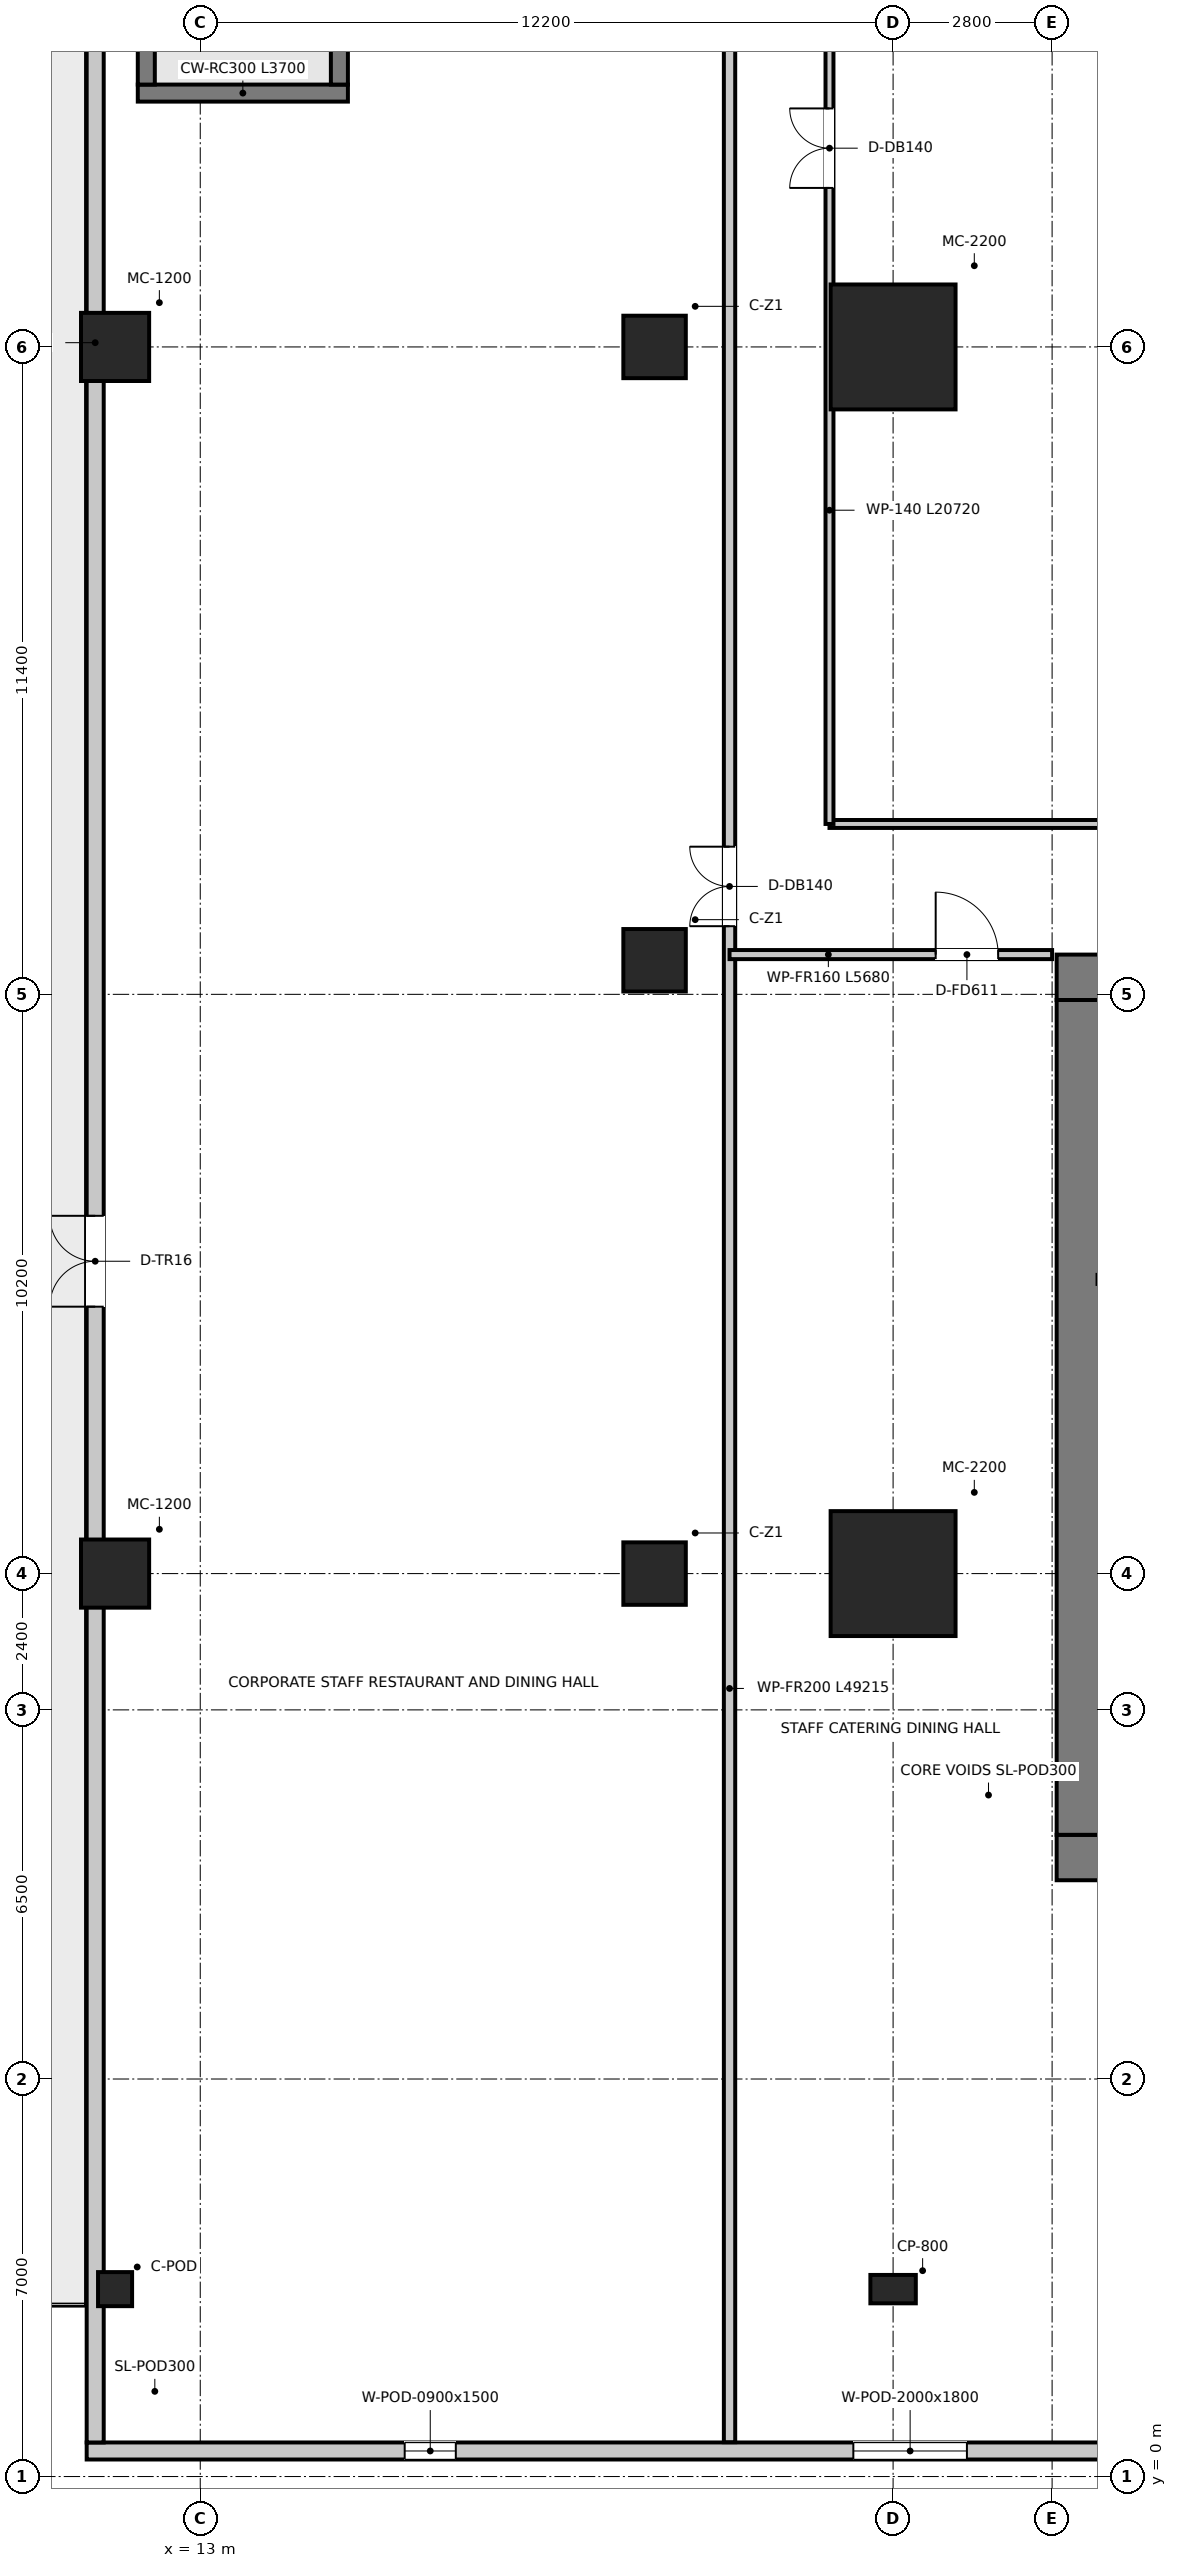
"""IFC4 building model, lengths in metres.
Left out: names, types, materials, properties, quantities, classifications, styles, units other than length and angle.
Written with IfcOpenShell. Run it as: python <this file> out.ifc"""

import sys

from ifc_helpers import new_model, si_unit, direction, frame, frame_2d, origin, origin_2d, place, context, subcontext, project, spatial, rectangle, extrude, source, transform, mapped, element, fill, save


model = new_model("IFC4")
c1 = context("Model", 3, precision=1e-05, world=origin(), true_north=direction((0.0, 1.0)))
c2 = subcontext(c1, "Body", "Model", "MODEL_VIEW")
j1 = project(units=[si_unit("LENGTHUNIT", "METRE"), si_unit("PLANEANGLEUNIT", "RADIAN")], contexts=[c1])
p1 = place(None, origin())
s1 = spatial("IfcSite", under=j1, at=p1, CompositionType="ELEMENT")
p2 = place(p1, origin())
s2 = spatial("IfcBuilding", under=s1, at=p2, CompositionType="ELEMENT")
p3 = place(p2, frame((0.0, 0.0, 15.4)))
s3 = spatial("IfcBuildingStorey", under=s2, at=p3, CompositionType="ELEMENT", Elevation=15.4)
p4 = place(p3, frame((28.08, 10.9, 0.0), z_axis=(0.0, 0.0, 1.0), x_axis=(1.0, 0.0, 0.0)))
e1 = element("IfcWall", 1, at=p4, inside=s3, PredefinedType="SHEAR", context=c2, shape_type="SweptSolid", body=[
    extrude(rectangle(XDim=15.84, YDim=0.8, at=frame_2d((7.92, 0.0))), origin(), (0.0, 0.0, 1.0), 4.6),
])
p5 = place(p3, frame((28.08, 26.4, 0.0), z_axis=(0.0, 0.0, 1.0), x_axis=(1.0, 0.0, 0.0)))
e2 = element("IfcWall", 2, at=p5, inside=s3, PredefinedType="SHEAR", context=c2, shape_type="SweptSolid", body=[
    extrude(rectangle(XDim=15.84, YDim=0.8, at=frame_2d((7.92, 0.0))), origin(), (0.0, 0.0, 1.0), 4.6),
])
p6 = place(p5, frame((7.22, 0.0, 0.0)))
e3 = element("IfcOpeningElement", 3, at=p6, cuts=e2, PredefinedType="OPENING", context=c2, shape_type="SweptSolid", body=[
    extrude(rectangle(XDim=1.4, YDim=2.2, at=frame_2d((0.7, 1.1))), frame((0.0, 0.41, 0.0), z_axis=(0.0, -1.0, 0.0), x_axis=(1.0, 0.0, 0.0)), (0.0, 0.0, 1.0), 0.82),
])
p7 = place(p5, frame((1.775, 0.0, 0.0)))
e4 = element("IfcOpeningElement", 4, at=p7, cuts=e2, PredefinedType="OPENING", context=c2, shape_type="SweptSolid", body=[
    extrude(rectangle(XDim=1.05, YDim=2.1, at=frame_2d((0.525, 1.05))), frame((0.0, 0.41, 0.0), z_axis=(0.0, -1.0, 0.0), x_axis=(1.0, 0.0, 0.0)), (0.0, 0.0, 1.0), 0.82),
])
p8 = place(p5, frame((13.015, 0.0, 0.0)))
e5 = element("IfcOpeningElement", 5, at=p8, cuts=e2, PredefinedType="OPENING", context=c2, shape_type="SweptSolid", body=[
    extrude(rectangle(XDim=1.05, YDim=2.1, at=frame_2d((0.525, 1.05))), frame((0.0, 0.41, 0.0), z_axis=(0.0, -1.0, 0.0), x_axis=(1.0, 0.0, 0.0)), (0.0, 0.0, 1.0), 0.82),
])
p9 = place(p3, frame((28.48, 11.3, 0.0), z_axis=(0.0, 0.0, 1.0), x_axis=(0.0, 1.0, 0.0)))
e6 = element("IfcWall", 6, at=p9, inside=s3, PredefinedType="SHEAR", context=c2, shape_type="SweptSolid", body=[
    extrude(rectangle(XDim=14.7, YDim=0.8, at=frame_2d((7.35, 0.0))), origin(), (0.0, 0.0, 1.0), 4.6),
])
p10 = place(p3, frame((11.9, 41.97, 0.0), z_axis=(0.0, 0.0, 1.0), x_axis=(1.0, 0.0, 0.0)))
e7 = element("IfcWall", 7, at=p10, inside=s3, PredefinedType="SHEAR", context=c2, shape_type="SweptSolid", body=[
    extrude(rectangle(XDim=3.7, YDim=0.3, at=frame_2d((1.85, 0.0))), origin(), (0.0, 0.0, 1.0), 4.6),
])
for number, where, z_axis, x_axis in (
    (8, (12.05, 42.12, 0.0), (0.0, 0.0, 1.0), (0.0, 1.0, 0.0)),
    (9, (15.45, 42.12, 0.0), (0.0, 0.0, 1.0), (0.0, 1.0, 0.0)),
):
    element("IfcWall", number, at=place(p3, frame(where, z_axis=z_axis, x_axis=x_axis)), inside=s3, PredefinedType="SHEAR", context=c2, shape_type="SweptSolid", body=[
        extrude(rectangle(XDim=7.48, YDim=0.3, at=frame_2d((3.74, 0.0))), origin(), (0.0, 0.0, 1.0), 4.6),
    ])
m1 = source(origin(), c2, "Body", "SweptSolid", [
    extrude(rectangle(XDim=2.2, YDim=2.2, at=origin_2d()), origin(), (0.0, 0.0, 1.0), 4.6),
])
for number, where, z_axis, x_axis in (
    (10, (25.2, 15.9, 0.0), (0.0, 0.0, 1.0), (1.0, 0.0, 0.0)),
    (11, (25.2, 37.5, 0.0), (0.0, 0.0, 1.0), (1.0, 0.0, 0.0)),
):
    element("IfcColumn", number, at=place(p3, frame(where, z_axis=z_axis, x_axis=x_axis)), inside=s3, PredefinedType="USERDEFINED", context=c2, shape_type="MappedRepresentation", body=[
        mapped(m1, transform((0.0, 0.0, 0.0), x_axis=(1.0, 0.0, 0.0), y_axis=(0.0, 1.0, 0.0), z_axis=(0.0, 0.0, 1.0), scale=1.0)),
    ])
m2 = source(origin(), c2, "Body", "SweptSolid", [
    extrude(rectangle(XDim=1.1, YDim=1.1, at=origin_2d()), origin(), (0.0, 0.0, 1.0), 4.6),
])
for number, where, z_axis, x_axis in (
    (12, (21.0, 15.9, 0.0), (0.0, 0.0, 1.0), (1.0, 0.0, 0.0)),
    (13, (21.0, 26.7, 0.0), (0.0, 0.0, 1.0), (1.0, 0.0, 0.0)),
    (14, (21.0, 37.5, 0.0), (0.0, 0.0, 1.0), (1.0, 0.0, 0.0)),
):
    element("IfcColumn", number, at=place(p3, frame(where, z_axis=z_axis, x_axis=x_axis)), inside=s3, PredefinedType="COLUMN", context=c2, shape_type="MappedRepresentation", body=[
        mapped(m2, transform((0.0, 0.0, 0.0), x_axis=(1.0, 0.0, 0.0), y_axis=(0.0, 1.0, 0.0), z_axis=(0.0, 0.0, 1.0), scale=1.0)),
    ])
m3 = source(origin(), c2, "Body", "SweptSolid", [
    extrude(rectangle(XDim=1.2, YDim=1.2, at=origin_2d()), origin(), (0.0, 0.0, 1.0), 4.6),
])
for number, where, z_axis, x_axis in (
    (15, (11.5, 15.9, 0.0), (0.0, 0.0, 1.0), (1.0, 0.0, 0.0)),
    (16, (11.5, 37.5, 0.0), (0.0, 0.0, 1.0), (1.0, 0.0, 0.0)),
):
    element("IfcColumn", number, at=place(p3, frame(where, z_axis=z_axis, x_axis=x_axis)), inside=s3, PredefinedType="USERDEFINED", context=c2, shape_type="MappedRepresentation", body=[
        mapped(m3, transform((0.0, 0.0, 0.0), x_axis=(1.0, 0.0, 0.0), y_axis=(0.0, 1.0, 0.0), z_axis=(0.0, 0.0, 1.0), scale=1.0)),
    ])
m4 = source(origin(), c2, "Body", "SweptSolid", [
    extrude(rectangle(XDim=0.6, YDim=0.6, at=origin_2d()), origin(), (0.0, 0.0, 1.0), 4.6),
])
p11 = place(p3, frame((11.5, 3.3, 0.0), z_axis=(0.0, 0.0, 1.0), x_axis=(1.0, 0.0, 0.0)))
e17 = element("IfcColumn", 17, at=p11, inside=s3, PredefinedType="COLUMN", context=c2, shape_type="MappedRepresentation", body=[
    mapped(m4, transform((0.0, 0.0, 0.0), x_axis=(1.0, 0.0, 0.0), y_axis=(0.0, 1.0, 0.0), z_axis=(0.0, 0.0, 1.0), scale=1.0)),
])
m5 = source(origin(), c2, "Body", "SweptSolid", [
    extrude(rectangle(XDim=0.8, YDim=0.5, at=origin_2d()), origin(), (0.0, 0.0, 1.0), 4.6),
])
p12 = place(p3, frame((25.2, 3.3, 0.0), z_axis=(0.0, 0.0, 1.0), x_axis=(1.0, 0.0, 0.0)))
e18 = element("IfcColumn", 18, at=p12, inside=s3, PredefinedType="PILASTER", context=c2, shape_type="MappedRepresentation", body=[
    mapped(m5, transform((0.0, 0.0, 0.0), x_axis=(1.0, 0.0, 0.0), y_axis=(0.0, 1.0, 0.0), z_axis=(0.0, 0.0, 1.0), scale=1.0)),
])
p13 = place(p3, frame((61.0, 0.45, 0.0), z_axis=(0.0, 0.0, 1.0), x_axis=(-1.0, 0.0, 0.0)))
e19 = element("IfcWall", 19, at=p13, inside=s3, PredefinedType="SOLIDWALL", context=c2, shape_type="SweptSolid", body=[
    extrude(rectangle(XDim=50.0, YDim=0.3, at=frame_2d((25.0, 0.0))), origin(), (0.0, 0.0, 1.0), 4.25),
])
p14 = place(p13, frame((43.5, 0.0, 1.25)))
e20 = element("IfcOpeningElement", 20, at=p14, cuts=e19, PredefinedType="OPENING", context=c2, shape_type="SweptSolid", body=[
    extrude(rectangle(XDim=0.9, YDim=1.5, at=frame_2d((0.45, 0.75))), frame((0.0, 0.16, 0.0), z_axis=(0.0, -1.0, 0.0), x_axis=(1.0, 0.0, 0.0)), (0.0, 0.0, 1.0), 0.32),
])
p15 = place(p13, frame((34.5, 0.0, 1.1)))
e21 = element("IfcOpeningElement", 21, at=p15, cuts=e19, PredefinedType="OPENING", context=c2, shape_type="SweptSolid", body=[
    extrude(rectangle(XDim=2.0, YDim=1.8, at=frame_2d((1.0, 0.9))), frame((0.0, 0.16, 0.0), z_axis=(0.0, -1.0, 0.0), x_axis=(1.0, 0.0, 0.0)), (0.0, 0.0, 1.0), 0.32),
])
p16 = place(p13, frame((28.0, 0.0, 0.9)))
e22 = element("IfcOpeningElement", 22, at=p16, cuts=e19, PredefinedType="OPENING", context=c2, shape_type="SweptSolid", body=[
    extrude(rectangle(XDim=2.4, YDim=2.6, at=frame_2d((1.2, 1.3))), frame((0.0, 0.16, 0.0), z_axis=(0.0, -1.0, 0.0), x_axis=(1.0, 0.0, 0.0)), (0.0, 0.0, 1.0), 0.32),
])
p17 = place(p13, frame((20.0, 0.0, 0.9)))
e23 = element("IfcOpeningElement", 23, at=p17, cuts=e19, PredefinedType="OPENING", context=c2, shape_type="SweptSolid", body=[
    extrude(rectangle(XDim=1.8, YDim=2.6, at=frame_2d((0.9, 1.3))), frame((0.0, 0.16, 0.0), z_axis=(0.0, -1.0, 0.0), x_axis=(1.0, 0.0, 0.0)), (0.0, 0.0, 1.0), 0.32),
])
p18 = place(p13, frame((10.5, 0.0, 0.95)))
e24 = element("IfcOpeningElement", 24, at=p18, cuts=e19, PredefinedType="OPENING", context=c2, shape_type="SweptSolid", body=[
    extrude(rectangle(XDim=1.5, YDim=2.4, at=frame_2d((0.75, 1.2))), frame((0.0, 0.16, 0.0), z_axis=(0.0, -1.0, 0.0), x_axis=(1.0, 0.0, 0.0)), (0.0, 0.0, 1.0), 0.32),
])
p19 = place(p3, frame((11.15, 0.6, 0.0), z_axis=(0.0, 0.0, 1.0), x_axis=(0.0, 1.0, 0.0)))
e25 = element("IfcWall", 25, at=p19, inside=s3, PredefinedType="SOLIDWALL", context=c2, shape_type="SweptSolid", body=[
    extrude(rectangle(XDim=52.2, YDim=0.3, at=frame_2d((26.1, 0.0))), origin(), (0.0, 0.0, 1.0), 2.45),
])
p20 = place(p19, frame((20.0, 0.0, 0.0)))
e26 = element("IfcOpeningElement", 26, at=p20, cuts=e25, PredefinedType="OPENING", context=c2, shape_type="SweptSolid", body=[
    extrude(rectangle(XDim=1.6, YDim=2.15, at=frame_2d((0.8, 1.075))), frame((0.0, 0.16, 0.0), z_axis=(0.0, -1.0, 0.0), x_axis=(1.0, 0.0, 0.0)), (0.0, 0.0, 1.0), 0.32),
])
p21 = place(p3, frame((24.08, 29.1, 0.0), z_axis=(0.0, 0.0, 1.0), x_axis=(1.0, 0.0, 0.0)))
e27 = element("IfcWall", 27, at=p21, inside=s3, PredefinedType="PARTITIONING", context=c2, shape_type="SweptSolid", body=[
    extrude(rectangle(XDim=28.04, YDim=0.14, at=frame_2d((14.02, 0.0))), origin(), (0.0, 0.0, 1.0), 3.45),
])
p22 = place(p21, frame((8.745, 0.0, 0.0)))
e28 = element("IfcOpeningElement", 28, at=p22, cuts=e27, PredefinedType="OPENING", context=c2, shape_type="SweptSolid", body=[
    extrude(rectangle(XDim=0.95, YDim=2.1, at=frame_2d((0.475, 1.05))), frame((0.0, 0.08, 0.0), z_axis=(0.0, -1.0, 0.0), x_axis=(1.0, 0.0, 0.0)), (0.0, 0.0, 1.0), 0.16),
])
p23 = place(p21, frame((13.145, 0.0, 0.0)))
e29 = element("IfcOpeningElement", 29, at=p23, cuts=e27, PredefinedType="OPENING", context=c2, shape_type="SweptSolid", body=[
    extrude(rectangle(XDim=0.95, YDim=2.1, at=frame_2d((0.475, 1.05))), frame((0.0, 0.08, 0.0), z_axis=(0.0, -1.0, 0.0), x_axis=(1.0, 0.0, 0.0)), (0.0, 0.0, 1.0), 0.16),
])
p24 = place(p21, frame((16.845, 0.0, 0.0)))
e30 = element("IfcOpeningElement", 30, at=p24, cuts=e27, PredefinedType="OPENING", context=c2, shape_type="SweptSolid", body=[
    extrude(rectangle(XDim=0.95, YDim=2.1, at=frame_2d((0.475, 1.05))), frame((0.0, 0.08, 0.0), z_axis=(0.0, -1.0, 0.0), x_axis=(1.0, 0.0, 0.0)), (0.0, 0.0, 1.0), 0.16),
])
p25 = place(p3, frame((22.32, 0.605, 0.0), z_axis=(0.0, 0.0, 1.0), x_axis=(0.0, 1.0, 0.0)))
e31 = element("IfcWall", 31, at=p25, inside=s3, PredefinedType="PARTITIONING", context=c2, shape_type="SweptSolid", body=[
    extrude(rectangle(XDim=49.215, YDim=0.2, at=frame_2d((24.607, 0.0))), origin(), (0.0, 0.0, 1.0), 3.55),
])
p26 = place(p25, frame((26.695, 0.0, 0.0)))
e32 = element("IfcOpeningElement", 32, at=p26, cuts=e31, PredefinedType="OPENING", context=c2, shape_type="SweptSolid", body=[
    extrude(rectangle(XDim=1.4, YDim=2.2, at=frame_2d((0.7, 1.1))), frame((0.0, 0.11, 0.0), z_axis=(0.0, -1.0, 0.0), x_axis=(1.0, 0.0, 0.0)), (0.0, 0.0, 1.0), 0.22),
])
p27 = place(p3, frame((24.08, 29.1, 0.0), z_axis=(0.0, 0.0, 1.0), x_axis=(0.0, 1.0, 0.0)))
e33 = element("IfcWall", 33, at=p27, inside=s3, PredefinedType="PARTITIONING", context=c2, shape_type="SweptSolid", body=[
    extrude(rectangle(XDim=20.72, YDim=0.14, at=frame_2d((10.36, 0.0))), origin(), (0.0, 0.0, 1.0), 3.55),
])
p28 = place(p27, frame((11.2, 0.0, 0.0)))
e34 = element("IfcOpeningElement", 34, at=p28, cuts=e33, PredefinedType="OPENING", context=c2, shape_type="SweptSolid", body=[
    extrude(rectangle(XDim=1.4, YDim=2.2, at=frame_2d((0.7, 1.1))), frame((0.0, 0.08, 0.0), z_axis=(0.0, -1.0, 0.0), x_axis=(1.0, 0.0, 0.0)), (0.0, 0.0, 1.0), 0.16),
])
p29 = place(p3, frame((22.32, 26.8, 0.0), z_axis=(0.0, 0.0, 1.0), x_axis=(1.0, 0.0, 0.0)))
e35 = element("IfcWall", 35, at=p29, inside=s3, PredefinedType="PARTITIONING", context=c2, shape_type="SweptSolid", body=[
    extrude(rectangle(XDim=5.68, YDim=0.16, at=frame_2d((2.84, 0.0))), origin(), (0.0, 0.0, 1.0), 3.45),
])
p30 = place(p29, frame((3.63, 0.0, 0.0)))
e36 = element("IfcOpeningElement", 36, at=p30, cuts=e35, PredefinedType="OPENING", context=c2, shape_type="SweptSolid", body=[
    extrude(rectangle(XDim=1.1, YDim=2.15, at=frame_2d((0.55, 1.075))), frame((0.0, 0.09, 0.0), z_axis=(0.0, -1.0, 0.0), x_axis=(1.0, 0.0, 0.0)), (0.0, 0.0, 1.0), 0.18),
])
p31 = place(p14, origin())
e37 = element("IfcWindow", 37, at=p31, inside=s3, PartitioningType="SINGLE_PANEL", PredefinedType="WINDOW", context=c2, shape_type="SweptSolid", body=[
    extrude(rectangle(XDim=0.9, YDim=1.5, at=frame_2d((0.45, 0.75))), frame((0.0, 0.03, 0.0), z_axis=(0.0, -1.0, 0.0), x_axis=(1.0, 0.0, 0.0)), (0.0, 0.0, 1.0), 0.06),
])
fill(e20, e37)
p32 = place(p15, origin())
e38 = element("IfcWindow", 38, at=p32, inside=s3, PartitioningType="SINGLE_PANEL", PredefinedType="WINDOW", context=c2, shape_type="SweptSolid", body=[
    extrude(rectangle(XDim=2.0, YDim=1.8, at=frame_2d((1.0, 0.9))), frame((0.0, 0.03, 0.0), z_axis=(0.0, -1.0, 0.0), x_axis=(1.0, 0.0, 0.0)), (0.0, 0.0, 1.0), 0.06),
])
fill(e21, e38)
p33 = place(p20, origin())
e39 = element("IfcDoor", 39, at=p33, inside=s3, OperationType="DOUBLE_DOOR_SINGLE_SWING", PredefinedType="DOOR", context=c2, shape_type="SweptSolid", body=[
    extrude(rectangle(XDim=1.6, YDim=2.15, at=frame_2d((0.8, 1.075))), frame((0.0, 0.025, 0.0), z_axis=(0.0, -1.0, 0.0), x_axis=(1.0, 0.0, 0.0)), (0.0, 0.0, 1.0), 0.05),
])
fill(e26, e39)
p34 = place(p26, origin())
e40 = element("IfcDoor", 40, at=p34, inside=s3, OperationType="DOUBLE_DOOR_SINGLE_SWING", PredefinedType="DOOR", context=c2, shape_type="SweptSolid", body=[
    extrude(rectangle(XDim=1.4, YDim=2.2, at=frame_2d((0.7, 1.1))), frame((0.0, 0.025, 0.0), z_axis=(0.0, -1.0, 0.0), x_axis=(1.0, 0.0, 0.0)), (0.0, 0.0, 1.0), 0.05),
])
fill(e32, e40)
p35 = place(p28, origin())
e41 = element("IfcDoor", 41, at=p35, inside=s3, OperationType="DOUBLE_DOOR_SINGLE_SWING", PredefinedType="DOOR", context=c2, shape_type="SweptSolid", body=[
    extrude(rectangle(XDim=1.4, YDim=2.2, at=frame_2d((0.7, 1.1))), frame((0.0, 0.025, 0.0), z_axis=(0.0, -1.0, 0.0), x_axis=(1.0, 0.0, 0.0)), (0.0, 0.0, 1.0), 0.05),
])
fill(e34, e41)
p36 = place(p30, origin())
e42 = element("IfcDoor", 42, at=p36, inside=s3, OperationType="SINGLE_SWING_LEFT", PredefinedType="DOOR", context=c2, shape_type="SweptSolid", body=[
    extrude(rectangle(XDim=1.1, YDim=2.15, at=frame_2d((0.55, 1.075))), frame((0.0, 0.025, 0.0), z_axis=(0.0, -1.0, 0.0), x_axis=(1.0, 0.0, 0.0)), (0.0, 0.0, 1.0), 0.05),
])
fill(e36, e42)
save(model, sys.argv[1])
